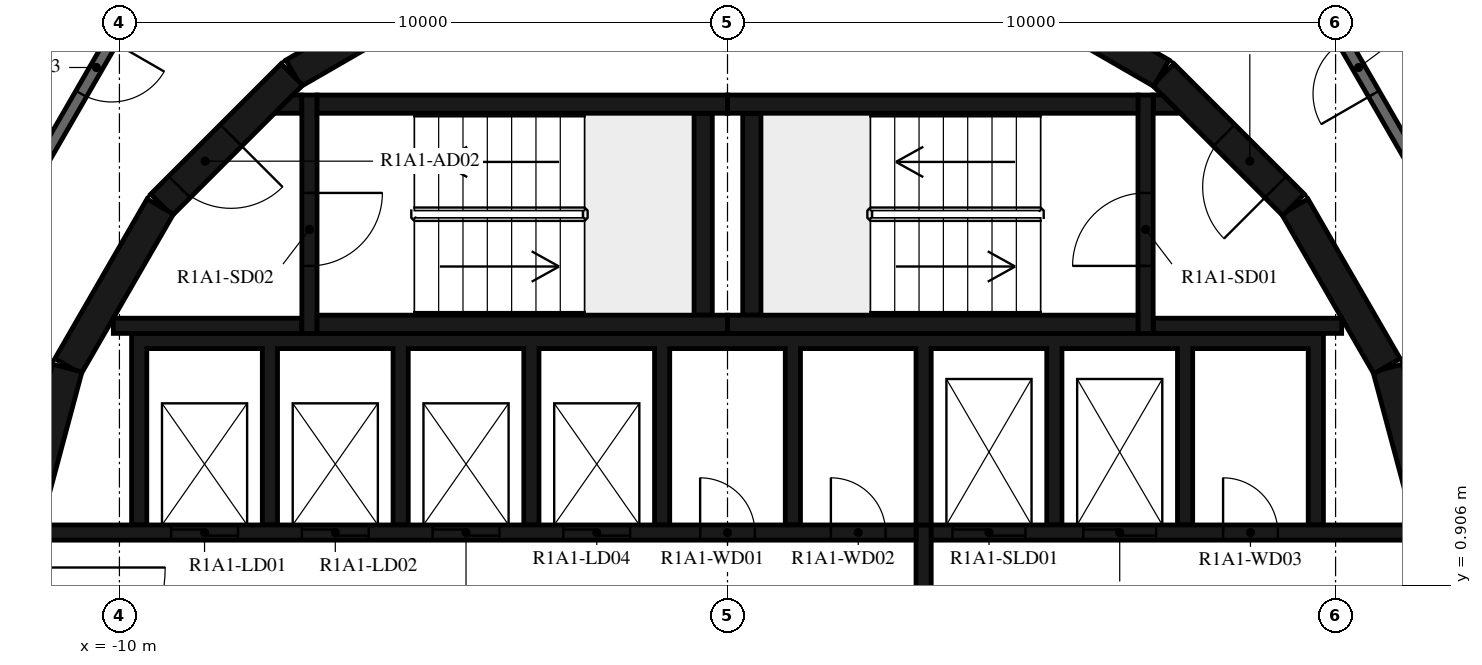
"""IFC4 building model, lengths in metres.
Left out: names, types, materials, properties, quantities, classifications, styles, units other than length and angle.
Written with IfcOpenShell. Run it as: python <this file> out.ifc"""

import sys

from ifc_helpers import new_model, si_unit, direction, frame, frame_2d, origin, place, context, subcontext, project, spatial, polyline, rectangle, outline, extrude, element, fill, save


model = new_model("IFC4")
c1 = context("Model", 3, precision=1e-05, world=origin(), true_north=direction((0.0, 1.0)))
c2 = subcontext(c1, "Body", "Model", "MODEL_VIEW")
j1 = project(units=[si_unit("LENGTHUNIT", "METRE"), si_unit("PLANEANGLEUNIT", "RADIAN")], contexts=[c1])
p1 = place(None, origin())
s1 = spatial("IfcSite", under=j1, at=p1, CompositionType="ELEMENT")
p2 = place(p1, origin())
s2 = spatial("IfcBuilding", under=s1, at=p2, CompositionType="ELEMENT")
p3 = place(p2, frame((0.0, 0.0, 41.9)))
s3 = spatial("IfcBuildingStorey", under=s2, at=p3, CompositionType="ELEMENT", Elevation=41.9)
for number, where, z_axis, x_axis in (
    (1, (11.643, 1.55, 0.0), (0.0, 0.0, 1.0), (-0.259, 0.966, 0.0)),
    (2, (10.845, 4.51, 0.0), (0.0, 0.0, 1.0), (-0.5, 0.866, 0.0)),
):
    element("IfcWall", number, at=place(p3, frame(where, z_axis=z_axis, x_axis=x_axis)), inside=s3, PredefinedType="SHEAR", context=c2, shape_type="SweptSolid", body=[
        extrude(rectangle(XDim=3.033, YDim=0.5, at=frame_2d((1.516, 0.0))), origin(), (0.0, 0.0, 1.0), 3.12),
    ])
p4 = place(p3, frame((9.308, 7.164, 0.0), z_axis=(0.0, 0.0, 1.0), x_axis=(-0.707106781187, 0.707106781187, 0.0)))
e3 = element("IfcWall", 3, at=p4, inside=s3, PredefinedType="SHEAR", context=c2, shape_type="SweptSolid", body=[
    extrude(rectangle(XDim=3.032, YDim=0.5, at=frame_2d((1.516, 0.0))), origin(), (0.0, 0.0, 1.0), 3.12),
])
p5 = place(p4, frame((0.416, 0.0, 0.0)))
e4 = element("IfcOpeningElement", 4, at=p5, cuts=e3, PredefinedType="OPENING", context=c2, shape_type="SweptSolid", body=[
    extrude(rectangle(XDim=1.2, YDim=2.1, at=frame_2d((0.6, 1.05))), frame((0.0, 0.26, 0.0), z_axis=(0.0, -1.0, 0.0), x_axis=(1.0, 0.0, 0.0)), (0.0, 0.0, 1.0), 0.52),
])
for number, where, z_axis, x_axis in (
    (5, (7.137, 9.329, 0.0), (0.0, 0.0, 1.0), (-0.866, 0.5, 0.0)),
    (6, (-4.51, 10.845, 0.0), (0.0, 0.0, 1.0), (-0.866, -0.5, 0.0)),
):
    element("IfcWall", number, at=place(p3, frame(where, z_axis=z_axis, x_axis=x_axis)), inside=s3, PredefinedType="SHEAR", context=c2, shape_type="SweptSolid", body=[
        extrude(rectangle(XDim=3.033, YDim=0.5, at=frame_2d((1.516, 0.0))), origin(), (0.0, 0.0, 1.0), 3.12),
    ])
p6 = place(p3, frame((-7.164, 9.308, 0.0), z_axis=(0.0, 0.0, 1.0), x_axis=(-0.707106781187, -0.707106781187, 0.0)))
e7 = element("IfcWall", 7, at=p6, inside=s3, PredefinedType="SHEAR", context=c2, shape_type="SweptSolid", body=[
    extrude(rectangle(XDim=3.032, YDim=0.5, at=frame_2d((1.516, 0.0))), origin(), (0.0, 0.0, 1.0), 3.12),
])
p7 = place(p6, frame((1.416, 0.0, 0.0)))
e8 = element("IfcOpeningElement", 8, at=p7, cuts=e7, PredefinedType="OPENING", context=c2, shape_type="SweptSolid", body=[
    extrude(rectangle(XDim=1.2, YDim=2.1, at=frame_2d((0.6, 1.05))), frame((0.0, 0.26, 0.0), z_axis=(0.0, -1.0, 0.0), x_axis=(1.0, 0.0, 0.0)), (0.0, 0.0, 1.0), 0.52),
])
for number, where, z_axis, x_axis in (
    (9, (-9.329, 7.137, 0.0), (0.0, 0.0, 1.0), (-0.5, -0.866, 0.0)),
    (10, (-10.858, 4.479, 0.0), (0.0, 0.0, 1.0), (-0.259, -0.966, 0.0)),
):
    element("IfcWall", number, at=place(p3, frame(where, z_axis=z_axis, x_axis=x_axis)), inside=s3, PredefinedType="SHEAR", context=c2, shape_type="SweptSolid", body=[
        extrude(rectangle(XDim=3.033, YDim=0.5, at=frame_2d((1.516, 0.0))), origin(), (0.0, 0.0, 1.0), 3.12),
    ])
for number, where, z_axis, x_axis in (
    (11, (0.0, 5.2, 0.0), (0.0, 0.0, 1.0), (1.0, 0.0, 0.0)),
    (12, (0.0, 8.82, 0.0), (0.0, 0.0, 1.0), (1.0, 0.0, 0.0)),
):
    element("IfcWall", number, at=place(p3, frame(where, z_axis=z_axis, x_axis=x_axis)), inside=s3, PredefinedType="SHEAR", context=c2, shape_type="SweptSolid", body=[
        extrude(rectangle(XDim=6.75, YDim=0.3, at=frame_2d((3.375, 0.0))), origin(), (0.0, 0.0, 1.0), 3.12),
    ])
p8 = place(p3, frame((0.4, 5.35, 0.0), z_axis=(0.0, 0.0, 1.0), x_axis=(0.0, 1.0, 0.0)))
e13 = element("IfcWall", 13, at=p8, inside=s3, PredefinedType="SHEAR", context=c2, shape_type="SweptSolid", body=[
    extrude(rectangle(XDim=3.32, YDim=0.3, at=frame_2d((1.66, 0.0))), origin(), (0.0, 0.0, 1.0), 3.12),
])
p9 = place(p3, frame((6.875, 5.05, 0.0), z_axis=(0.0, 0.0, 1.0), x_axis=(0.0, 1.0, 0.0)))
e14 = element("IfcWall", 14, at=p9, inside=s3, PredefinedType="SHEAR", context=c2, shape_type="SweptSolid", body=[
    extrude(rectangle(XDim=3.92, YDim=0.25, at=frame_2d((1.96, 0.0))), origin(), (0.0, 0.0, 1.0), 3.12),
])
p10 = place(p9, frame((1.11, 0.0, 0.0)))
e15 = element("IfcOpeningElement", 15, at=p10, cuts=e14, PredefinedType="OPENING", context=c2, shape_type="SweptSolid", body=[
    extrude(rectangle(XDim=1.2, YDim=2.1, at=frame_2d((0.6, 1.05))), frame((0.0, 0.135, 0.0), z_axis=(0.0, -1.0, 0.0), x_axis=(1.0, 0.0, 0.0)), (0.0, 0.0, 1.0), 0.27),
])
p11 = place(p3, frame((7.0, 5.175, 0.0), z_axis=(0.0, 0.0, 1.0), x_axis=(1.0, 0.0, 0.0)))
e16 = element("IfcWall", 16, at=p11, inside=s3, PredefinedType="SHEAR", context=c2, shape_type="SweptSolid", body=[
    extrude(rectangle(XDim=3.1, YDim=0.25, at=frame_2d((1.55, 0.0))), origin(), (0.0, 0.0, 1.0), 3.12),
])
p12 = place(p3, origin())
e17 = element("IfcWall", 17, at=p12, inside=s3, PredefinedType="SHEAR", context=c2, shape_type="SweptSolid", body=[
    extrude(outline(polyline([(7.448, 8.67), (7.0, 8.67), (7.0, 8.97), (7.148, 8.97), (7.448, 8.67)])), origin(), (0.0, 0.0, 1.0), 3.12),
])
for number, where, z_axis, x_axis in (
    (18, (-6.75, 5.2, 0.0), (0.0, 0.0, 1.0), (1.0, 0.0, 0.0)),
    (19, (-6.75, 8.82, 0.0), (0.0, 0.0, 1.0), (1.0, 0.0, 0.0)),
):
    element("IfcWall", number, at=place(p3, frame(where, z_axis=z_axis, x_axis=x_axis)), inside=s3, PredefinedType="SHEAR", context=c2, shape_type="SweptSolid", body=[
        extrude(rectangle(XDim=6.75, YDim=0.3, at=frame_2d((3.375, 0.0))), origin(), (0.0, 0.0, 1.0), 3.12),
    ])
p13 = place(p3, frame((-0.4, 5.35, 0.0), z_axis=(0.0, 0.0, 1.0), x_axis=(0.0, 1.0, 0.0)))
e20 = element("IfcWall", 20, at=p13, inside=s3, PredefinedType="SHEAR", context=c2, shape_type="SweptSolid", body=[
    extrude(rectangle(XDim=3.32, YDim=0.3, at=frame_2d((1.66, 0.0))), origin(), (0.0, 0.0, 1.0), 3.12),
])
p14 = place(p3, frame((-6.875, 8.97, 0.0), z_axis=(0.0, 0.0, 1.0), x_axis=(0.0, -1.0, 0.0)))
e21 = element("IfcWall", 21, at=p14, inside=s3, PredefinedType="SHEAR", context=c2, shape_type="SweptSolid", body=[
    extrude(rectangle(XDim=3.92, YDim=0.25, at=frame_2d((1.96, 0.0))), origin(), (0.0, 0.0, 1.0), 3.12),
])
p15 = place(p14, frame((1.61, 0.0, 0.0)))
e22 = element("IfcOpeningElement", 22, at=p15, cuts=e21, PredefinedType="OPENING", context=c2, shape_type="SweptSolid", body=[
    extrude(rectangle(XDim=1.2, YDim=2.1, at=frame_2d((0.6, 1.05))), frame((0.0, 0.135, 0.0), z_axis=(0.0, -1.0, 0.0), x_axis=(1.0, 0.0, 0.0)), (0.0, 0.0, 1.0), 0.27),
])
p16 = place(p3, frame((-7.0, 5.175, 0.0), z_axis=(0.0, 0.0, 1.0), x_axis=(-1.0, 0.0, 0.0)))
e23 = element("IfcWall", 23, at=p16, inside=s3, PredefinedType="SHEAR", context=c2, shape_type="SweptSolid", body=[
    extrude(rectangle(XDim=3.1, YDim=0.25, at=frame_2d((1.55, 0.0))), origin(), (0.0, 0.0, 1.0), 3.12),
])
p17 = place(p3, origin())
e24 = element("IfcWall", 24, at=p17, inside=s3, PredefinedType="SHEAR", context=c2, shape_type="SweptSolid", body=[
    extrude(outline(polyline([(-7.148, 8.97), (-7.0, 8.97), (-7.0, 8.67), (-7.448, 8.67), (-7.148, 8.97)])), origin(), (0.0, 0.0, 1.0), 3.12),
])
p18 = place(p3, origin())
e25 = element("IfcWall", 25, at=p18, inside=s3, PredefinedType="SHEAR", context=c2, shape_type="SweptSolid", body=[
    extrude(outline(polyline([(-9.55, 4.8), (-7.65, 4.8), (-7.65, 1.9), (-7.4, 1.9), (-7.4, 4.8), (-5.5, 4.8), (-5.5, 1.9), (-5.25, 1.9), (-5.25, 4.8), (-3.35, 4.8), (-3.35, 1.9), (-3.1, 1.9), (-3.1, 4.8), (-1.2, 4.8), (-1.2, 1.9), (-0.95, 1.9), (-0.95, 4.8), (0.95, 4.8), (0.95, 1.9), (1.2, 1.9), (1.2, 4.8), (3.1, 4.8), (3.1, 1.9), (3.35, 1.9), (3.35, 4.8), (5.25, 4.8), (5.25, 1.9), (5.5, 1.9), (5.5, 4.8), (7.4, 4.8), (7.4, 1.9), (7.65, 1.9), (7.65, 4.8), (9.55, 4.8), (9.55, 1.9), (9.8, 1.9), (9.8, 4.8), (9.8, 5.05), (-9.8, 5.05), (-9.8, 4.8), (-9.8, 1.9), (-9.55, 1.9), (-9.55, 4.8)])), origin(), (0.0, 0.0, 1.0), 3.12),
])
p19 = place(p3, frame((-11.28, 1.775, 0.0), z_axis=(0.0, 0.0, 1.0), x_axis=(1.0, 0.0, 0.0)))
e26 = element("IfcWall", 26, at=p19, inside=s3, PredefinedType="SHEAR", context=c2, shape_type="SweptSolid", body=[
    extrude(rectangle(XDim=14.38, YDim=0.25, at=frame_2d((7.19, 0.0))), origin(), (0.0, 0.0, 1.0), 3.12),
])
p20 = place(p19, frame((2.13, 0.0, 0.0)))
e27 = element("IfcOpeningElement", 27, at=p20, cuts=e26, PredefinedType="OPENING", context=c2, shape_type="SweptSolid", body=[
    extrude(rectangle(XDim=1.1, YDim=2.1, at=frame_2d((0.55, 1.05))), frame((0.0, 0.135, 0.0), z_axis=(0.0, -1.0, 0.0), x_axis=(1.0, 0.0, 0.0)), (0.0, 0.0, 1.0), 0.27),
])
p21 = place(p19, frame((4.28, 0.0, 0.0)))
e28 = element("IfcOpeningElement", 28, at=p21, cuts=e26, PredefinedType="OPENING", context=c2, shape_type="SweptSolid", body=[
    extrude(rectangle(XDim=1.1, YDim=2.1, at=frame_2d((0.55, 1.05))), frame((0.0, 0.135, 0.0), z_axis=(0.0, -1.0, 0.0), x_axis=(1.0, 0.0, 0.0)), (0.0, 0.0, 1.0), 0.27),
])
p22 = place(p19, frame((6.43, 0.0, 0.0)))
e29 = element("IfcOpeningElement", 29, at=p22, cuts=e26, PredefinedType="OPENING", context=c2, shape_type="SweptSolid", body=[
    extrude(rectangle(XDim=1.1, YDim=2.1, at=frame_2d((0.55, 1.05))), frame((0.0, 0.135, 0.0), z_axis=(0.0, -1.0, 0.0), x_axis=(1.0, 0.0, 0.0)), (0.0, 0.0, 1.0), 0.27),
])
p23 = place(p19, frame((8.58, 0.0, 0.0)))
e30 = element("IfcOpeningElement", 30, at=p23, cuts=e26, PredefinedType="OPENING", context=c2, shape_type="SweptSolid", body=[
    extrude(rectangle(XDim=1.1, YDim=2.1, at=frame_2d((0.55, 1.05))), frame((0.0, 0.135, 0.0), z_axis=(0.0, -1.0, 0.0), x_axis=(1.0, 0.0, 0.0)), (0.0, 0.0, 1.0), 0.27),
])
p24 = place(p19, frame((10.83, 0.0, 0.0)))
e31 = element("IfcOpeningElement", 31, at=p24, cuts=e26, PredefinedType="OPENING", context=c2, shape_type="SweptSolid", body=[
    extrude(rectangle(XDim=0.9, YDim=2.1, at=frame_2d((0.45, 1.05))), frame((0.0, 0.135, 0.0), z_axis=(0.0, -1.0, 0.0), x_axis=(1.0, 0.0, 0.0)), (0.0, 0.0, 1.0), 0.27),
])
p25 = place(p19, frame((12.98, 0.0, 0.0)))
e32 = element("IfcOpeningElement", 32, at=p25, cuts=e26, PredefinedType="OPENING", context=c2, shape_type="SweptSolid", body=[
    extrude(rectangle(XDim=0.9, YDim=2.1, at=frame_2d((0.45, 1.05))), frame((0.0, 0.135, 0.0), z_axis=(0.0, -1.0, 0.0), x_axis=(1.0, 0.0, 0.0)), (0.0, 0.0, 1.0), 0.27),
])
p26 = place(p3, frame((3.35, 1.775, 0.0), z_axis=(0.0, 0.0, 1.0), x_axis=(1.0, 0.0, 0.0)))
e33 = element("IfcWall", 33, at=p26, inside=s3, PredefinedType="SHEAR", context=c2, shape_type="SweptSolid", body=[
    extrude(rectangle(XDim=7.93, YDim=0.25, at=frame_2d((3.965, 0.0))), origin(), (0.0, 0.0, 1.0), 3.12),
])
p27 = place(p26, frame((0.35, 0.0, 0.0)))
e34 = element("IfcOpeningElement", 34, at=p27, cuts=e33, PredefinedType="OPENING", context=c2, shape_type="SweptSolid", body=[
    extrude(rectangle(XDim=1.2, YDim=2.4, at=frame_2d((0.6, 1.2))), frame((0.0, 0.135, 0.0), z_axis=(0.0, -1.0, 0.0), x_axis=(1.0, 0.0, 0.0)), (0.0, 0.0, 1.0), 0.27),
])
p28 = place(p26, frame((2.5, 0.0, 0.0)))
e35 = element("IfcOpeningElement", 35, at=p28, cuts=e33, PredefinedType="OPENING", context=c2, shape_type="SweptSolid", body=[
    extrude(rectangle(XDim=1.2, YDim=2.4, at=frame_2d((0.6, 1.2))), frame((0.0, 0.135, 0.0), z_axis=(0.0, -1.0, 0.0), x_axis=(1.0, 0.0, 0.0)), (0.0, 0.0, 1.0), 0.27),
])
p29 = place(p26, frame((4.8, 0.0, 0.0)))
e36 = element("IfcOpeningElement", 36, at=p29, cuts=e33, PredefinedType="OPENING", context=c2, shape_type="SweptSolid", body=[
    extrude(rectangle(XDim=0.9, YDim=2.1, at=frame_2d((0.45, 1.05))), frame((0.0, 0.135, 0.0), z_axis=(0.0, -1.0, 0.0), x_axis=(1.0, 0.0, 0.0)), (0.0, 0.0, 1.0), 0.27),
])
p30 = place(p3, frame((3.225, -1.9, 0.0), z_axis=(0.0, 0.0, 1.0), x_axis=(0.0, 1.0, 0.0)))
e37 = element("IfcWall", 37, at=p30, inside=s3, PredefinedType="SHEAR", context=c2, shape_type="SweptSolid", body=[
    extrude(rectangle(XDim=3.8, YDim=0.25, at=frame_2d((1.9, 0.0))), origin(), (0.0, 0.0, 1.0), 3.12),
])
p31 = place(p3, frame((13.7, 3.671, 0.0), z_axis=(0.0, 0.0, 1.0), x_axis=(-0.500001669485, 0.866024439905, 0.0)))
e38 = element("IfcWall", 38, at=p31, inside=s3, PredefinedType="STANDARD", context=c2, shape_type="SweptSolid", body=[
    extrude(rectangle(XDim=7.342, YDim=0.2, at=frame_2d((3.671, 0.0))), origin(), (0.0, 0.0, 1.0), 3.12),
])
p32 = place(p31, frame((6.142, 0.0, 0.0)))
e39 = element("IfcOpeningElement", 39, at=p32, cuts=e38, PredefinedType="OPENING", context=c2, shape_type="SweptSolid", body=[
    extrude(rectangle(XDim=1.0, YDim=2.1, at=frame_2d((0.5, 1.05))), frame((0.0, 0.11, 0.0), z_axis=(0.0, -1.0, 0.0), x_axis=(1.0, 0.0, 0.0)), (0.0, 0.0, 1.0), 0.22),
])
p33 = place(p3, frame((-10.029, 10.029, 0.0), z_axis=(0.0, 0.0, 1.0), x_axis=(-0.500001669485, -0.866024439905, 0.0)))
e40 = element("IfcWall", 40, at=p33, inside=s3, PredefinedType="STANDARD", context=c2, shape_type="SweptSolid", body=[
    extrude(rectangle(XDim=7.342, YDim=0.2, at=frame_2d((3.671, 0.0))), origin(), (0.0, 0.0, 1.0), 3.12),
])
p34 = place(p33, frame((0.2, 0.0, 0.0)))
e41 = element("IfcOpeningElement", 41, at=p34, cuts=e40, PredefinedType="OPENING", context=c2, shape_type="SweptSolid", body=[
    extrude(rectangle(XDim=1.0, YDim=2.1, at=frame_2d((0.5, 1.05))), frame((0.0, 0.11, 0.0), z_axis=(0.0, -1.0, 0.0), x_axis=(1.0, 0.0, 0.0)), (0.0, 0.0, 1.0), 0.22),
])
p35 = place(p3, frame((12.781, 8.262, 0.0), z_axis=(0.0, 0.0, 1.0), x_axis=(-0.492233259633, 0.870463335305, 0.0)))
e42 = element("IfcWall", 42, at=p35, inside=s3, PredefinedType="PARTITIONING", context=c2, shape_type="SweptSolid", body=[
    extrude(rectangle(XDim=3.336, YDim=0.12, at=frame_2d((1.668, 0.0))), origin(), (0.0, 0.0, 1.0), 3.12),
])
p36 = place(p10, origin())
e43 = element("IfcDoor", 43, at=p36, inside=s3, OperationType="SINGLE_SWING_LEFT", PredefinedType="DOOR", context=c2, shape_type="SweptSolid", body=[
    extrude(rectangle(XDim=1.2, YDim=2.1, at=frame_2d((0.6, 1.05))), frame((0.0, 0.025, 0.0), z_axis=(0.0, -1.0, 0.0), x_axis=(1.0, 0.0, 0.0)), (0.0, 0.0, 1.0), 0.05),
])
fill(e15, e43)
p37 = place(p5, origin())
e44 = element("IfcDoor", 44, at=p37, inside=s3, OperationType="SINGLE_SWING_RIGHT", PredefinedType="DOOR", context=c2, shape_type="SweptSolid", body=[
    extrude(rectangle(XDim=1.2, YDim=2.1, at=frame_2d((0.6, 1.05))), frame((0.0, 0.025, 0.0), z_axis=(0.0, -1.0, 0.0), x_axis=(1.0, 0.0, 0.0)), (0.0, 0.0, 1.0), 0.05),
])
fill(e4, e44)
p38 = place(p15, origin())
e45 = element("IfcDoor", 45, at=p38, inside=s3, OperationType="SINGLE_SWING_LEFT", PredefinedType="DOOR", context=c2, shape_type="SweptSolid", body=[
    extrude(rectangle(XDim=1.2, YDim=2.1, at=frame_2d((0.6, 1.05))), frame((0.0, 0.025, 0.0), z_axis=(0.0, -1.0, 0.0), x_axis=(1.0, 0.0, 0.0)), (0.0, 0.0, 1.0), 0.05),
])
fill(e22, e45)
p39 = place(p7, origin())
e46 = element("IfcDoor", 46, at=p39, inside=s3, OperationType="SINGLE_SWING_RIGHT", PredefinedType="DOOR", context=c2, shape_type="SweptSolid", body=[
    extrude(rectangle(XDim=1.2, YDim=2.1, at=frame_2d((0.6, 1.05))), frame((0.0, 0.025, 0.0), z_axis=(0.0, -1.0, 0.0), x_axis=(1.0, 0.0, 0.0)), (0.0, 0.0, 1.0), 0.05),
])
fill(e8, e46)
p40 = place(p20, origin())
e47 = element("IfcDoor", 47, at=p40, inside=s3, OperationType="DOUBLE_DOOR_SLIDING", PredefinedType="DOOR", context=c2, shape_type="SweptSolid", body=[
    extrude(rectangle(XDim=1.1, YDim=2.1, at=frame_2d((0.55, 1.05))), frame((0.0, 0.025, 0.0), z_axis=(0.0, -1.0, 0.0), x_axis=(1.0, 0.0, 0.0)), (0.0, 0.0, 1.0), 0.05),
])
fill(e27, e47)
p41 = place(p21, origin())
e48 = element("IfcDoor", 48, at=p41, inside=s3, OperationType="DOUBLE_DOOR_SLIDING", PredefinedType="DOOR", context=c2, shape_type="SweptSolid", body=[
    extrude(rectangle(XDim=1.1, YDim=2.1, at=frame_2d((0.55, 1.05))), frame((0.0, 0.025, 0.0), z_axis=(0.0, -1.0, 0.0), x_axis=(1.0, 0.0, 0.0)), (0.0, 0.0, 1.0), 0.05),
])
fill(e28, e48)
p42 = place(p22, origin())
e49 = element("IfcDoor", 49, at=p42, inside=s3, OperationType="DOUBLE_DOOR_SLIDING", PredefinedType="DOOR", context=c2, shape_type="SweptSolid", body=[
    extrude(rectangle(XDim=1.1, YDim=2.1, at=frame_2d((0.55, 1.05))), frame((0.0, 0.025, 0.0), z_axis=(0.0, -1.0, 0.0), x_axis=(1.0, 0.0, 0.0)), (0.0, 0.0, 1.0), 0.05),
])
fill(e29, e49)
p43 = place(p23, origin())
e50 = element("IfcDoor", 50, at=p43, inside=s3, OperationType="DOUBLE_DOOR_SLIDING", PredefinedType="DOOR", context=c2, shape_type="SweptSolid", body=[
    extrude(rectangle(XDim=1.1, YDim=2.1, at=frame_2d((0.55, 1.05))), frame((0.0, 0.025, 0.0), z_axis=(0.0, -1.0, 0.0), x_axis=(1.0, 0.0, 0.0)), (0.0, 0.0, 1.0), 0.05),
])
fill(e30, e50)
p44 = place(p27, origin())
e51 = element("IfcDoor", 51, at=p44, inside=s3, OperationType="DOUBLE_DOOR_SLIDING", PredefinedType="DOOR", context=c2, shape_type="SweptSolid", body=[
    extrude(rectangle(XDim=1.2, YDim=2.4, at=frame_2d((0.6, 1.2))), frame((0.0, 0.025, 0.0), z_axis=(0.0, -1.0, 0.0), x_axis=(1.0, 0.0, 0.0)), (0.0, 0.0, 1.0), 0.05),
])
fill(e34, e51)
p45 = place(p28, origin())
e52 = element("IfcDoor", 52, at=p45, inside=s3, OperationType="DOUBLE_DOOR_SLIDING", PredefinedType="DOOR", context=c2, shape_type="SweptSolid", body=[
    extrude(rectangle(XDim=1.2, YDim=2.4, at=frame_2d((0.6, 1.2))), frame((0.0, 0.025, 0.0), z_axis=(0.0, -1.0, 0.0), x_axis=(1.0, 0.0, 0.0)), (0.0, 0.0, 1.0), 0.05),
])
fill(e35, e52)
p46 = place(p24, origin())
e53 = element("IfcDoor", 53, at=p46, inside=s3, OperationType="SINGLE_SWING_RIGHT", PredefinedType="DOOR", context=c2, shape_type="SweptSolid", body=[
    extrude(rectangle(XDim=0.9, YDim=2.1, at=frame_2d((0.45, 1.05))), frame((0.0, 0.025, 0.0), z_axis=(0.0, -1.0, 0.0), x_axis=(1.0, 0.0, 0.0)), (0.0, 0.0, 1.0), 0.05),
])
fill(e31, e53)
p47 = place(p25, origin())
e54 = element("IfcDoor", 54, at=p47, inside=s3, OperationType="SINGLE_SWING_LEFT", PredefinedType="DOOR", context=c2, shape_type="SweptSolid", body=[
    extrude(rectangle(XDim=0.9, YDim=2.1, at=frame_2d((0.45, 1.05))), frame((0.0, 0.025, 0.0), z_axis=(0.0, -1.0, 0.0), x_axis=(1.0, 0.0, 0.0)), (0.0, 0.0, 1.0), 0.05),
])
fill(e32, e54)
p48 = place(p29, origin())
e55 = element("IfcDoor", 55, at=p48, inside=s3, OperationType="SINGLE_SWING_RIGHT", PredefinedType="DOOR", context=c2, shape_type="SweptSolid", body=[
    extrude(rectangle(XDim=0.9, YDim=2.1, at=frame_2d((0.45, 1.05))), frame((0.0, 0.025, 0.0), z_axis=(0.0, -1.0, 0.0), x_axis=(1.0, 0.0, 0.0)), (0.0, 0.0, 1.0), 0.05),
])
fill(e36, e55)
p49 = place(p32, origin())
e56 = element("IfcDoor", 56, at=p49, inside=s3, OperationType="SINGLE_SWING_RIGHT", PredefinedType="DOOR", context=c2, shape_type="SweptSolid", body=[
    extrude(rectangle(XDim=1.0, YDim=2.1, at=frame_2d((0.5, 1.05))), frame((0.0, 0.025, 0.0), z_axis=(0.0, -1.0, 0.0), x_axis=(1.0, 0.0, 0.0)), (0.0, 0.0, 1.0), 0.05),
])
fill(e39, e56)
p50 = place(p34, origin())
e57 = element("IfcDoor", 57, at=p50, inside=s3, OperationType="SINGLE_SWING_LEFT", PredefinedType="DOOR", context=c2, shape_type="SweptSolid", body=[
    extrude(rectangle(XDim=1.0, YDim=2.1, at=frame_2d((0.5, 1.05))), frame((0.0, 0.025, 0.0), z_axis=(0.0, -1.0, 0.0), x_axis=(1.0, 0.0, 0.0)), (0.0, 0.0, 1.0), 0.05),
])
fill(e41, e57)
save(model, sys.argv[1])
